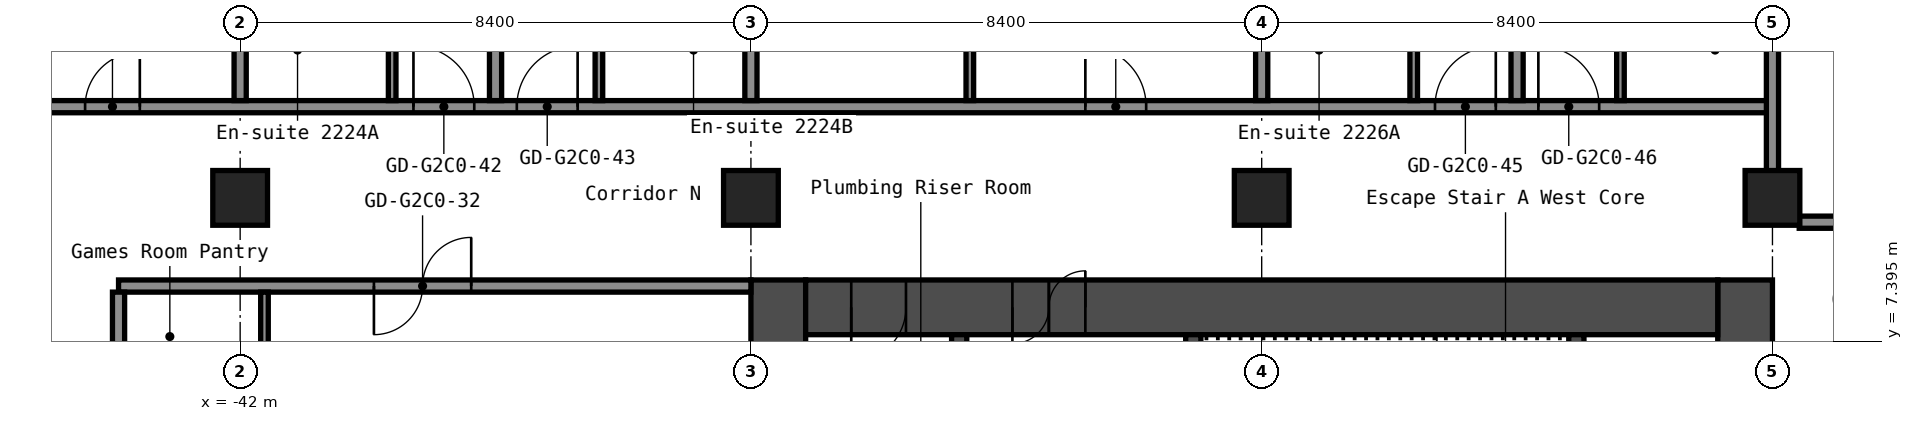
"""IFC4 building model, lengths in metres.
Left out: names, types, materials, properties, quantities, classifications, styles, units other than length and angle.
Written with IfcOpenShell. Run it as: python <this file> out.ifc"""

import sys

from ifc_helpers import new_model, si_unit, direction, frame, frame_2d, origin, origin_2d, place, context, subcontext, project, spatial, rectangle, hollow_rectangle, extrude, element, fill, save


model = new_model("IFC4")
c1 = context("Model", 3, precision=1e-05, world=origin(), true_north=direction((0.0, 1.0)))
c2 = subcontext(c1, "Body", "Model", "MODEL_VIEW")
j1 = project(units=[si_unit("LENGTHUNIT", "METRE"), si_unit("PLANEANGLEUNIT", "RADIAN")], contexts=[c1])
p1 = place(None, origin())
s1 = spatial("IfcSite", under=j1, at=p1, CompositionType="ELEMENT")
p2 = place(p1, origin())
s2 = spatial("IfcBuilding", under=s1, at=p2, CompositionType="ELEMENT")
p3 = place(p2, frame((0.0, 0.0, 81.8)))
s3 = spatial("IfcBuildingStorey", under=s2, at=p3, CompositionType="ELEMENT", Elevation=81.8)
for number, where, z_axis, x_axis in (
    (1, (-42.0, 9.75, 0.0), (0.0, 0.0, 1.0), (1.0, 0.0, 0.0)),
    (2, (-33.6, 9.75, 0.0), (0.0, 0.0, 1.0), (1.0, 0.0, 0.0)),
    (3, (-25.2, 9.75, 0.0), (0.0, 0.0, 1.0), (1.0, 0.0, 0.0)),
    (4, (-16.8, 9.75, 0.0), (0.0, 0.0, 1.0), (1.0, 0.0, 0.0)),
):
    element("IfcColumn", number, at=place(p3, frame(where, z_axis=z_axis, x_axis=x_axis)), inside=s3, PredefinedType="COLUMN", context=c2, shape_type="SweptSolid", body=[
        extrude(hollow_rectangle(XDim=0.9, YDim=0.9, WallThickness=0.036, at=origin_2d()), origin(), (0.0, 0.0, 1.0), 2.8),
    ])
p4 = place(p3, frame((-17.25, -8.4, 0.0), z_axis=(0.0, 0.0, 1.0), x_axis=(0.0, 1.0, 0.0)))
e5 = element("IfcWall", 5, at=p4, inside=s3, PredefinedType="SHEAR", context=c2, shape_type="SweptSolid", body=[
    extrude(rectangle(XDim=16.8, YDim=0.9, at=frame_2d((8.4, 0.0))), origin(), (0.0, 0.0, 1.0), 2.8),
])
p5 = place(p4, frame((7.6, 0.0, 0.0)))
e6 = element("IfcOpeningElement", 6, at=p5, cuts=e5, PredefinedType="OPENING", context=c2, shape_type="SweptSolid", body=[
    extrude(rectangle(XDim=1.2, YDim=2.1, at=frame_2d((0.6, 1.05))), frame((0.0, 0.46, 0.0), z_axis=(0.0, -1.0, 0.0), x_axis=(1.0, 0.0, 0.0)), (0.0, 0.0, 1.0), 0.92),
])
p6 = place(p3, frame((-33.15, -8.4, 0.0), z_axis=(0.0, 0.0, 1.0), x_axis=(0.0, 1.0, 0.0)))
e7 = element("IfcWall", 7, at=p6, inside=s3, PredefinedType="SHEAR", context=c2, shape_type="SweptSolid", body=[
    extrude(rectangle(XDim=16.8, YDim=0.9, at=frame_2d((8.4, 0.0))), origin(), (0.0, 0.0, 1.0), 2.8),
])
p7 = place(p3, frame((-32.7, 7.95, 0.0), z_axis=(0.0, 0.0, 1.0), x_axis=(1.0, 0.0, 0.0)))
e8 = element("IfcWall", 8, at=p7, inside=s3, PredefinedType="SHEAR", context=c2, shape_type="SweptSolid", body=[
    extrude(rectangle(XDim=15.0, YDim=0.9, at=frame_2d((7.5, 0.0))), origin(), (0.0, 0.0, 1.0), 2.8),
])
p8 = place(p7, frame((3.4, 0.0, 0.0)))
e9 = element("IfcOpeningElement", 9, at=p8, cuts=e8, PredefinedType="OPENING", context=c2, shape_type="SweptSolid", body=[
    extrude(rectangle(XDim=1.2, YDim=2.1, at=frame_2d((0.6, 1.05))), frame((0.0, 0.46, 0.0), z_axis=(0.0, -1.0, 0.0), x_axis=(1.0, 0.0, 0.0)), (0.0, 0.0, 1.0), 0.92),
])
p9 = place(p7, frame((0.75, 0.0, 0.0)))
e10 = element("IfcOpeningElement", 10, at=p9, cuts=e8, PredefinedType="OPENING", context=c2, shape_type="SweptSolid", body=[
    extrude(rectangle(XDim=0.9, YDim=2.1, at=frame_2d((0.45, 1.05))), frame((0.0, 0.46, 0.0), z_axis=(0.0, -1.0, 0.0), x_axis=(1.0, 0.0, 0.0)), (0.0, 0.0, 1.0), 0.92),
])
p10 = place(p3, frame((-20.025, 1.2, 0.0), z_axis=(0.0, 0.0, 1.0), x_axis=(0.0, 1.0, 0.0)))
e11 = element("IfcWall", 11, at=p10, inside=s3, PredefinedType="SHEAR", context=c2, shape_type="SweptSolid", body=[
    extrude(rectangle(XDim=6.3, YDim=0.25, at=frame_2d((3.15, 0.0))), origin(), (0.0, 0.0, 1.0), 2.8),
])
p11 = place(p3, frame((-26.325, 3.75, 0.0), z_axis=(0.0, 0.0, 1.0), x_axis=(0.0, 1.0, 0.0)))
e12 = element("IfcWall", 12, at=p11, inside=s3, PredefinedType="SHEAR", context=c2, shape_type="SweptSolid", body=[
    extrude(rectangle(XDim=3.75, YDim=0.25, at=frame_2d((1.875, 0.0))), origin(), (0.0, 0.0, 1.0), 2.8),
])
p12 = place(p11, frame((1.25, 0.0, 0.0)))
e13 = element("IfcOpeningElement", 13, at=p12, cuts=e12, PredefinedType="OPENING", context=c2, shape_type="SweptSolid", body=[
    extrude(rectangle(XDim=1.2, YDim=2.1, at=frame_2d((0.6, 1.05))), frame((0.0, 0.135, 0.0), z_axis=(0.0, -1.0, 0.0), x_axis=(1.0, 0.0, 0.0)), (0.0, 0.0, 1.0), 0.27),
])
p13 = place(p3, frame((-30.175, 1.45, 0.0), z_axis=(0.0, 0.0, 1.0), x_axis=(0.0, 1.0, 0.0)))
e14 = element("IfcWall", 14, at=p13, inside=s3, PredefinedType="SHEAR", context=c2, shape_type="SweptSolid", body=[
    extrude(rectangle(XDim=6.05, YDim=0.25, at=frame_2d((3.025, 0.0))), origin(), (0.0, 0.0, 1.0), 2.8),
])
p14 = place(p13, frame((2.625, 0.0, 0.0)))
e15 = element("IfcOpeningElement", 15, at=p14, cuts=e14, PredefinedType="OPENING", context=c2, shape_type="SweptSolid", body=[
    extrude(rectangle(XDim=1.1, YDim=2.1, at=frame_2d((0.55, 1.05))), frame((0.0, 0.135, 0.0), z_axis=(0.0, -1.0, 0.0), x_axis=(1.0, 0.0, 0.0)), (0.0, 0.0, 1.0), 0.27),
])
p15 = place(p3, frame((-44.0, 8.3, 0.0), z_axis=(0.0, 0.0, 1.0), x_axis=(1.0, 0.0, 0.0)))
e16 = element("IfcWall", 16, at=p15, inside=s3, PredefinedType="PARTITIONING", context=c2, shape_type="SweptSolid", body=[
    extrude(rectangle(XDim=10.4, YDim=0.2, at=frame_2d((5.2, 0.0))), origin(), (0.0, 0.0, 1.0), 2.8),
])
p16 = place(p15, frame((4.2, 0.0, 0.0)))
e17 = element("IfcOpeningElement", 17, at=p16, cuts=e16, PredefinedType="OPENING", context=c2, shape_type="SweptSolid", body=[
    extrude(rectangle(XDim=1.6, YDim=2.1, at=frame_2d((0.8, 1.05))), frame((0.0, 0.11, 0.0), z_axis=(0.0, -1.0, 0.0), x_axis=(1.0, 0.0, 0.0)), (0.0, 0.0, 1.0), 0.22),
])
p17 = place(p3, frame((-16.36, 9.35, 0.0), z_axis=(0.0, 0.0, 1.0), x_axis=(1.0, 0.0, 0.0)))
e18 = element("IfcWall", 18, at=p17, inside=s3, PredefinedType="PARTITIONING", context=c2, shape_type="SweptSolid", body=[
    extrude(rectangle(XDim=32.72, YDim=0.2, at=frame_2d((16.36, 0.0))), origin(), (0.0, 0.0, 1.0), 2.8),
])
p18 = place(p17, frame((1.56, 0.0, 0.0)))
e19 = element("IfcOpeningElement", 19, at=p18, cuts=e18, PredefinedType="OPENING", context=c2, shape_type="SweptSolid", body=[
    extrude(rectangle(XDim=1.0, YDim=2.1, at=frame_2d((0.5, 1.05))), frame((0.0, 0.11, 0.0), z_axis=(0.0, -1.0, 0.0), x_axis=(1.0, 0.0, 0.0)), (0.0, 0.0, 1.0), 0.22),
])
p19 = place(p17, frame((10.81, 0.0, 0.0)))
e20 = element("IfcOpeningElement", 20, at=p19, cuts=e18, PredefinedType="OPENING", context=c2, shape_type="SweptSolid", body=[
    extrude(rectangle(XDim=1.0, YDim=2.1, at=frame_2d((0.5, 1.05))), frame((0.0, 0.11, 0.0), z_axis=(0.0, -1.0, 0.0), x_axis=(1.0, 0.0, 0.0)), (0.0, 0.0, 1.0), 0.22),
])
p20 = place(p17, frame((12.51, 0.0, 0.0)))
e21 = element("IfcOpeningElement", 21, at=p20, cuts=e18, PredefinedType="OPENING", context=c2, shape_type="SweptSolid", body=[
    extrude(rectangle(XDim=1.0, YDim=2.1, at=frame_2d((0.5, 1.05))), frame((0.0, 0.11, 0.0), z_axis=(0.0, -1.0, 0.0), x_axis=(1.0, 0.0, 0.0)), (0.0, 0.0, 1.0), 0.22),
])
p21 = place(p17, frame((18.26, 0.0, 0.0)))
e22 = element("IfcOpeningElement", 22, at=p21, cuts=e18, PredefinedType="OPENING", context=c2, shape_type="SweptSolid", body=[
    extrude(rectangle(XDim=0.9, YDim=2.1, at=frame_2d((0.45, 1.05))), frame((0.0, 0.11, 0.0), z_axis=(0.0, -1.0, 0.0), x_axis=(1.0, 0.0, 0.0)), (0.0, 0.0, 1.0), 0.22),
])
p22 = place(p17, frame((22.46, 0.0, 0.0)))
e23 = element("IfcOpeningElement", 23, at=p22, cuts=e18, PredefinedType="OPENING", context=c2, shape_type="SweptSolid", body=[
    extrude(rectangle(XDim=0.9, YDim=2.1, at=frame_2d((0.45, 1.05))), frame((0.0, 0.11, 0.0), z_axis=(0.0, -1.0, 0.0), x_axis=(1.0, 0.0, 0.0)), (0.0, 0.0, 1.0), 0.22),
])
p23 = place(p17, frame((26.58, 0.0, 0.0)))
e24 = element("IfcOpeningElement", 24, at=p23, cuts=e18, PredefinedType="OPENING", context=c2, shape_type="SweptSolid", body=[
    extrude(rectangle(XDim=0.9, YDim=2.1, at=frame_2d((0.45, 1.05))), frame((0.0, 0.11, 0.0), z_axis=(0.0, -1.0, 0.0), x_axis=(1.0, 0.0, 0.0)), (0.0, 0.0, 1.0), 0.22),
])
p24 = place(p17, frame((30.78, 0.0, 0.0)))
e25 = element("IfcOpeningElement", 25, at=p24, cuts=e18, PredefinedType="OPENING", context=c2, shape_type="SweptSolid", body=[
    extrude(rectangle(XDim=0.9, YDim=2.1, at=frame_2d((0.45, 1.05))), frame((0.0, 0.11, 0.0), z_axis=(0.0, -1.0, 0.0), x_axis=(1.0, 0.0, 0.0)), (0.0, 0.0, 1.0), 0.22),
])
p25 = place(p3, frame((-46.5, 11.25, 0.0), z_axis=(0.0, 0.0, 1.0), x_axis=(1.0, 0.0, 0.0)))
e26 = element("IfcWall", 26, at=p25, inside=s3, PredefinedType="PARTITIONING", context=c2, shape_type="SweptSolid", body=[
    extrude(rectangle(XDim=29.7, YDim=0.2, at=frame_2d((14.85, 0.0))), origin(), (0.0, 0.0, 1.0), 2.8),
])
p26 = place(p25, frame((1.95, 0.0, 0.0)))
e27 = element("IfcOpeningElement", 27, at=p26, cuts=e26, PredefinedType="OPENING", context=c2, shape_type="SweptSolid", body=[
    extrude(rectangle(XDim=0.9, YDim=2.1, at=frame_2d((0.45, 1.05))), frame((0.0, 0.11, 0.0), z_axis=(0.0, -1.0, 0.0), x_axis=(1.0, 0.0, 0.0)), (0.0, 0.0, 1.0), 0.22),
])
p27 = place(p25, frame((7.35, 0.0, 0.0)))
e28 = element("IfcOpeningElement", 28, at=p27, cuts=e26, PredefinedType="OPENING", context=c2, shape_type="SweptSolid", body=[
    extrude(rectangle(XDim=1.0, YDim=2.1, at=frame_2d((0.5, 1.05))), frame((0.0, 0.11, 0.0), z_axis=(0.0, -1.0, 0.0), x_axis=(1.0, 0.0, 0.0)), (0.0, 0.0, 1.0), 0.22),
])
p28 = place(p25, frame((9.05, 0.0, 0.0)))
e29 = element("IfcOpeningElement", 29, at=p28, cuts=e26, PredefinedType="OPENING", context=c2, shape_type="SweptSolid", body=[
    extrude(rectangle(XDim=1.0, YDim=2.1, at=frame_2d((0.5, 1.05))), frame((0.0, 0.11, 0.0), z_axis=(0.0, -1.0, 0.0), x_axis=(1.0, 0.0, 0.0)), (0.0, 0.0, 1.0), 0.22),
])
p29 = place(p25, frame((18.4, 0.0, 0.0)))
e30 = element("IfcOpeningElement", 30, at=p29, cuts=e26, PredefinedType="OPENING", context=c2, shape_type="SweptSolid", body=[
    extrude(rectangle(XDim=1.0, YDim=2.1, at=frame_2d((0.5, 1.05))), frame((0.0, 0.11, 0.0), z_axis=(0.0, -1.0, 0.0), x_axis=(1.0, 0.0, 0.0)), (0.0, 0.0, 1.0), 0.22),
])
p30 = place(p25, frame((24.15, 0.0, 0.0)))
e31 = element("IfcOpeningElement", 31, at=p30, cuts=e26, PredefinedType="OPENING", context=c2, shape_type="SweptSolid", body=[
    extrude(rectangle(XDim=1.0, YDim=2.1, at=frame_2d((0.5, 1.05))), frame((0.0, 0.11, 0.0), z_axis=(0.0, -1.0, 0.0), x_axis=(1.0, 0.0, 0.0)), (0.0, 0.0, 1.0), 0.22),
])
p31 = place(p25, frame((25.85, 0.0, 0.0)))
e32 = element("IfcOpeningElement", 32, at=p31, cuts=e26, PredefinedType="OPENING", context=c2, shape_type="SweptSolid", body=[
    extrude(rectangle(XDim=1.0, YDim=2.1, at=frame_2d((0.5, 1.05))), frame((0.0, 0.11, 0.0), z_axis=(0.0, -1.0, 0.0), x_axis=(1.0, 0.0, 0.0)), (0.0, 0.0, 1.0), 0.22),
])
p32 = place(p3, frame((-44.0, -8.2, 0.0), z_axis=(0.0, 0.0, 1.0), x_axis=(0.0, 1.0, 0.0)))
e33 = element("IfcWall", 33, at=p32, inside=s3, PredefinedType="PARTITIONING", context=c2, shape_type="SweptSolid", body=[
    extrude(rectangle(XDim=16.4, YDim=0.2, at=frame_2d((8.2, 0.0))), origin(), (0.0, 0.0, 1.0), 2.8),
])
p33 = place(p3, frame((-42.0, 11.35, 0.0), z_axis=(0.0, 0.0, 1.0), x_axis=(0.0, 1.0, 0.0)))
e34 = element("IfcWall", 34, at=p33, inside=s3, PredefinedType="PARTITIONING", context=c2, shape_type="SweptSolid", body=[
    extrude(rectangle(XDim=12.2, YDim=0.2, at=frame_2d((6.1, 0.0))), origin(), (0.0, 0.0, 1.0), 2.8),
])
p34 = place(p3, frame((-41.6, 5.7, 0.0), z_axis=(0.0, 0.0, 1.0), x_axis=(0.0, 1.0, 0.0)))
e35 = element("IfcWall", 35, at=p34, inside=s3, PredefinedType="PARTITIONING", context=c2, shape_type="SweptSolid", body=[
    extrude(rectangle(XDim=2.5, YDim=0.125, at=frame_2d((1.25, 0.0))), origin(), (0.0, 0.0, 1.0), 2.8),
])
p35 = place(p34, frame((0.55, 0.0, 0.0)))
e36 = element("IfcOpeningElement", 36, at=p35, cuts=e35, PredefinedType="OPENING", context=c2, shape_type="SweptSolid", body=[
    extrude(rectangle(XDim=0.9, YDim=2.1, at=frame_2d((0.45, 1.05))), frame((0.0, 0.073, 0.0), z_axis=(0.0, -1.0, 0.0), x_axis=(1.0, 0.0, 0.0)), (0.0, 0.0, 1.0), 0.145),
])
p36 = place(p3, frame((-39.5, 11.35, 0.0), z_axis=(0.0, 0.0, 1.0), x_axis=(0.0, 1.0, 0.0)))
e37 = element("IfcWall", 37, at=p36, inside=s3, PredefinedType="PARTITIONING", context=c2, shape_type="SweptSolid", body=[
    extrude(rectangle(XDim=2.9, YDim=0.125, at=frame_2d((1.45, 0.0))), origin(), (0.0, 0.0, 1.0), 2.8),
])
p37 = place(p36, frame((1.5, 0.0, 0.0)))
e38 = element("IfcOpeningElement", 38, at=p37, cuts=e37, PredefinedType="OPENING", context=c2, shape_type="SweptSolid", body=[
    extrude(rectangle(XDim=0.8, YDim=2.1, at=frame_2d((0.4, 1.05))), frame((0.0, 0.073, 0.0), z_axis=(0.0, -1.0, 0.0), x_axis=(1.0, 0.0, 0.0)), (0.0, 0.0, 1.0), 0.145),
])
p38 = place(p3, frame((-37.8, 11.35, 0.0), z_axis=(0.0, 0.0, 1.0), x_axis=(0.0, 1.0, 0.0)))
e39 = element("IfcWall", 39, at=p38, inside=s3, PredefinedType="PARTITIONING", context=c2, shape_type="SweptSolid", body=[
    extrude(rectangle(XDim=12.2, YDim=0.2, at=frame_2d((6.1, 0.0))), origin(), (0.0, 0.0, 1.0), 2.8),
])
p39 = place(p3, frame((-36.1, 11.35, 0.0), z_axis=(0.0, 0.0, 1.0), x_axis=(0.0, 1.0, 0.0)))
e40 = element("IfcWall", 40, at=p39, inside=s3, PredefinedType="PARTITIONING", context=c2, shape_type="SweptSolid", body=[
    extrude(rectangle(XDim=2.9, YDim=0.125, at=frame_2d((1.45, 0.0))), origin(), (0.0, 0.0, 1.0), 2.8),
])
p40 = place(p39, frame((1.5, 0.0, 0.0)))
e41 = element("IfcOpeningElement", 41, at=p40, cuts=e40, PredefinedType="OPENING", context=c2, shape_type="SweptSolid", body=[
    extrude(rectangle(XDim=0.8, YDim=2.1, at=frame_2d((0.4, 1.05))), frame((0.0, 0.073, 0.0), z_axis=(0.0, -1.0, 0.0), x_axis=(1.0, 0.0, 0.0)), (0.0, 0.0, 1.0), 0.145),
])
p41 = place(p3, frame((-33.6, 11.35, 0.0), z_axis=(0.0, 0.0, 1.0), x_axis=(0.0, 1.0, 0.0)))
e42 = element("IfcWall", 42, at=p41, inside=s3, PredefinedType="PARTITIONING", context=c2, shape_type="SweptSolid", body=[
    extrude(rectangle(XDim=12.2, YDim=0.2, at=frame_2d((6.1, 0.0))), origin(), (0.0, 0.0, 1.0), 2.8),
])
p42 = place(p3, frame((-30.0, 11.35, 0.0), z_axis=(0.0, 0.0, 1.0), x_axis=(0.0, 1.0, 0.0)))
e43 = element("IfcWall", 43, at=p42, inside=s3, PredefinedType="PARTITIONING", context=c2, shape_type="SweptSolid", body=[
    extrude(rectangle(XDim=3.3, YDim=0.125, at=frame_2d((1.65, 0.0))), origin(), (0.0, 0.0, 1.0), 2.8),
])
p43 = place(p42, frame((1.1, 0.0, 0.0)))
e44 = element("IfcOpeningElement", 44, at=p43, cuts=e43, PredefinedType="OPENING", context=c2, shape_type="SweptSolid", body=[
    extrude(rectangle(XDim=1.0, YDim=2.1, at=frame_2d((0.5, 1.05))), frame((0.0, 0.073, 0.0), z_axis=(0.0, -1.0, 0.0), x_axis=(1.0, 0.0, 0.0)), (0.0, 0.0, 1.0), 0.145),
])
p44 = place(p3, frame((-25.2, 11.35, 0.0), z_axis=(0.0, 0.0, 1.0), x_axis=(0.0, 1.0, 0.0)))
e45 = element("IfcWall", 45, at=p44, inside=s3, PredefinedType="PARTITIONING", context=c2, shape_type="SweptSolid", body=[
    extrude(rectangle(XDim=12.2, YDim=0.2, at=frame_2d((6.1, 0.0))), origin(), (0.0, 0.0, 1.0), 2.8),
])
p45 = place(p3, frame((-22.7, 11.35, 0.0), z_axis=(0.0, 0.0, 1.0), x_axis=(0.0, 1.0, 0.0)))
e46 = element("IfcWall", 46, at=p45, inside=s3, PredefinedType="PARTITIONING", context=c2, shape_type="SweptSolid", body=[
    extrude(rectangle(XDim=2.9, YDim=0.125, at=frame_2d((1.45, 0.0))), origin(), (0.0, 0.0, 1.0), 2.8),
])
p46 = place(p45, frame((1.5, 0.0, 0.0)))
e47 = element("IfcOpeningElement", 47, at=p46, cuts=e46, PredefinedType="OPENING", context=c2, shape_type="SweptSolid", body=[
    extrude(rectangle(XDim=0.8, YDim=2.1, at=frame_2d((0.4, 1.05))), frame((0.0, 0.073, 0.0), z_axis=(0.0, -1.0, 0.0), x_axis=(1.0, 0.0, 0.0)), (0.0, 0.0, 1.0), 0.145),
])
p47 = place(p3, frame((-21.0, 11.35, 0.0), z_axis=(0.0, 0.0, 1.0), x_axis=(0.0, 1.0, 0.0)))
e48 = element("IfcWall", 48, at=p47, inside=s3, PredefinedType="PARTITIONING", context=c2, shape_type="SweptSolid", body=[
    extrude(rectangle(XDim=12.2, YDim=0.2, at=frame_2d((6.1, 0.0))), origin(), (0.0, 0.0, 1.0), 2.8),
])
p48 = place(p3, frame((-19.3, 11.35, 0.0), z_axis=(0.0, 0.0, 1.0), x_axis=(0.0, 1.0, 0.0)))
e49 = element("IfcWall", 49, at=p48, inside=s3, PredefinedType="PARTITIONING", context=c2, shape_type="SweptSolid", body=[
    extrude(rectangle(XDim=2.9, YDim=0.125, at=frame_2d((1.45, 0.0))), origin(), (0.0, 0.0, 1.0), 2.8),
])
p49 = place(p48, frame((1.5, 0.0, 0.0)))
e50 = element("IfcOpeningElement", 50, at=p49, cuts=e49, PredefinedType="OPENING", context=c2, shape_type="SweptSolid", body=[
    extrude(rectangle(XDim=0.8, YDim=2.1, at=frame_2d((0.4, 1.05))), frame((0.0, 0.073, 0.0), z_axis=(0.0, -1.0, 0.0), x_axis=(1.0, 0.0, 0.0)), (0.0, 0.0, 1.0), 0.145),
])
p50 = place(p3, frame((-16.8, 10.19, 0.0), z_axis=(0.0, 0.0, 1.0), x_axis=(0.0, 1.0, 0.0)))
e51 = element("IfcWall", 51, at=p50, inside=s3, PredefinedType="PARTITIONING", context=c2, shape_type="SweptSolid", body=[
    extrude(rectangle(XDim=13.36, YDim=0.2, at=frame_2d((6.68, 0.0))), origin(), (0.0, 0.0, 1.0), 2.8),
])
p51 = place(p8, origin())
e52 = element("IfcDoor", 52, at=p51, inside=s3, OperationType="DOUBLE_DOOR_SINGLE_SWING", PredefinedType="DOOR", context=c2, shape_type="SweptSolid", body=[
    extrude(rectangle(XDim=1.2, YDim=2.1, at=frame_2d((0.6, 1.05))), frame((0.0, 0.025, 0.0), z_axis=(0.0, -1.0, 0.0), x_axis=(1.0, 0.0, 0.0)), (0.0, 0.0, 1.0), 0.05),
])
fill(e9, e52)
p52 = place(p9, origin())
e53 = element("IfcDoor", 53, at=p52, inside=s3, OperationType="SINGLE_SWING_LEFT", PredefinedType="DOOR", context=c2, shape_type="SweptSolid", body=[
    extrude(rectangle(XDim=0.9, YDim=2.1, at=frame_2d((0.45, 1.05))), frame((0.0, 0.025, 0.0), z_axis=(0.0, -1.0, 0.0), x_axis=(1.0, 0.0, 0.0)), (0.0, 0.0, 1.0), 0.05),
])
fill(e10, e53)
p53 = place(p16, origin())
e54 = element("IfcDoor", 54, at=p53, inside=s3, OperationType="DOUBLE_DOOR_SINGLE_SWING", PredefinedType="DOOR", context=c2, shape_type="SweptSolid", body=[
    extrude(rectangle(XDim=1.6, YDim=2.1, at=frame_2d((0.8, 1.05))), frame((0.0, 0.025, 0.0), z_axis=(0.0, -1.0, 0.0), x_axis=(1.0, 0.0, 0.0)), (0.0, 0.0, 1.0), 0.05),
])
fill(e17, e54)
p54 = place(p26, origin())
e55 = element("IfcDoor", 55, at=p54, inside=s3, OperationType="SINGLE_SWING_LEFT", PredefinedType="DOOR", context=c2, shape_type="SweptSolid", body=[
    extrude(rectangle(XDim=0.9, YDim=2.1, at=frame_2d((0.45, 1.05))), frame((0.0, 0.025, 0.0), z_axis=(0.0, -1.0, 0.0), x_axis=(1.0, 0.0, 0.0)), (0.0, 0.0, 1.0), 0.05),
])
fill(e27, e55)
p55 = place(p27, origin())
e56 = element("IfcDoor", 56, at=p55, inside=s3, OperationType="SINGLE_SWING_RIGHT", PredefinedType="DOOR", context=c2, shape_type="SweptSolid", body=[
    extrude(rectangle(XDim=1.0, YDim=2.1, at=frame_2d((0.5, 1.05))), frame((0.0, 0.025, 0.0), z_axis=(0.0, -1.0, 0.0), x_axis=(1.0, 0.0, 0.0)), (0.0, 0.0, 1.0), 0.05),
])
fill(e28, e56)
p56 = place(p28, origin())
e57 = element("IfcDoor", 57, at=p56, inside=s3, OperationType="SINGLE_SWING_LEFT", PredefinedType="DOOR", context=c2, shape_type="SweptSolid", body=[
    extrude(rectangle(XDim=1.0, YDim=2.1, at=frame_2d((0.5, 1.05))), frame((0.0, 0.025, 0.0), z_axis=(0.0, -1.0, 0.0), x_axis=(1.0, 0.0, 0.0)), (0.0, 0.0, 1.0), 0.05),
])
fill(e29, e57)
p57 = place(p29, origin())
e58 = element("IfcDoor", 58, at=p57, inside=s3, OperationType="SINGLE_SWING_RIGHT", PredefinedType="DOOR", context=c2, shape_type="SweptSolid", body=[
    extrude(rectangle(XDim=1.0, YDim=2.1, at=frame_2d((0.5, 1.05))), frame((0.0, 0.025, 0.0), z_axis=(0.0, -1.0, 0.0), x_axis=(1.0, 0.0, 0.0)), (0.0, 0.0, 1.0), 0.05),
])
fill(e30, e58)
p58 = place(p30, origin())
e59 = element("IfcDoor", 59, at=p58, inside=s3, OperationType="SINGLE_SWING_LEFT", PredefinedType="DOOR", context=c2, shape_type="SweptSolid", body=[
    extrude(rectangle(XDim=1.0, YDim=2.1, at=frame_2d((0.5, 1.05))), frame((0.0, 0.025, 0.0), z_axis=(0.0, -1.0, 0.0), x_axis=(1.0, 0.0, 0.0)), (0.0, 0.0, 1.0), 0.05),
])
fill(e31, e59)
p59 = place(p31, origin())
e60 = element("IfcDoor", 60, at=p59, inside=s3, OperationType="SINGLE_SWING_RIGHT", PredefinedType="DOOR", context=c2, shape_type="SweptSolid", body=[
    extrude(rectangle(XDim=1.0, YDim=2.1, at=frame_2d((0.5, 1.05))), frame((0.0, 0.025, 0.0), z_axis=(0.0, -1.0, 0.0), x_axis=(1.0, 0.0, 0.0)), (0.0, 0.0, 1.0), 0.05),
])
fill(e32, e60)
save(model, sys.argv[1])
